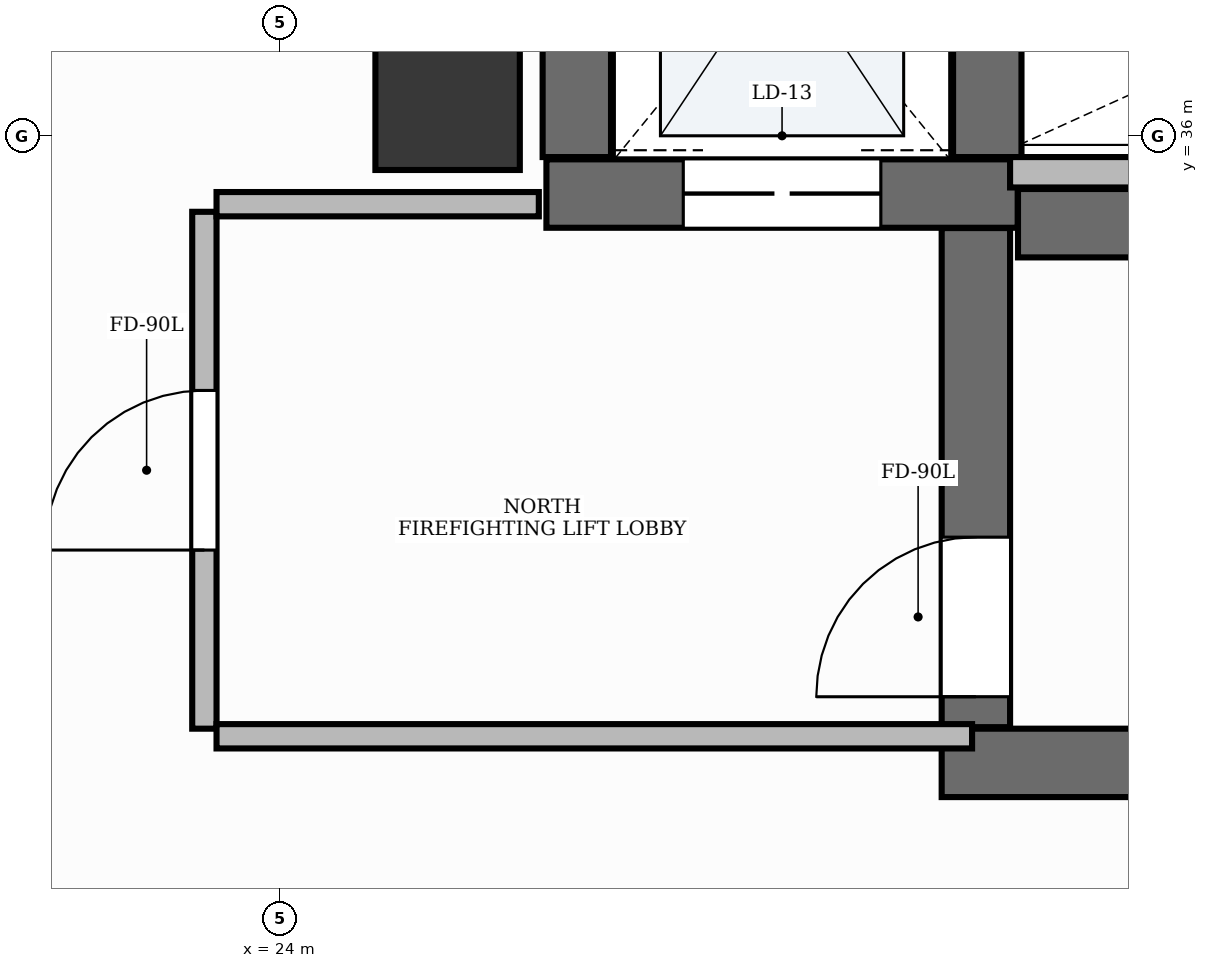
"""IFC4 building model, lengths in metres.
Left out: names, types, materials, properties, quantities, classifications, styles, units other than length and angle.
Written with IfcOpenShell. Run it as: python <this file> out.ifc"""

import sys

from ifc_helpers import new_model, si_unit, direction, frame, frame_2d, origin, origin_2d, place, context, subcontext, project, spatial, rectangle, extrude, element, fill, save


model = new_model("IFC4")
c1 = context("Model", 3, precision=1e-05, world=origin(), true_north=direction((0.0, 1.0)))
c2 = subcontext(c1, "Body", "Model", "MODEL_VIEW")
j1 = project(units=[si_unit("LENGTHUNIT", "METRE"), si_unit("PLANEANGLEUNIT", "RADIAN")], contexts=[c1])
p1 = place(None, origin())
s1 = spatial("IfcSite", under=j1, at=p1, CompositionType="ELEMENT")
p2 = place(p1, origin())
s2 = spatial("IfcBuilding", under=s1, at=p2, CompositionType="ELEMENT")
p3 = place(p2, frame((0.0, 0.0, 38.4)))
s3 = spatial("IfcBuildingStorey", under=s2, at=p3, CompositionType="ELEMENT", Elevation=38.4)
p4 = place(p3, frame((28.852, 35.425, 0.0), z_axis=(0.0, 0.0, 1.0), x_axis=(1.0, 0.0, 0.0)))
e1 = element("IfcWall", 1, at=p4, inside=s3, PredefinedType="SHEAR", context=c2, shape_type="SweptSolid", body=[
    extrude(rectangle(XDim=8.248, YDim=0.45, at=frame_2d((4.124, 0.0))), origin(), (0.0, 0.0, 1.0), 3.9),
])
p5 = place(p3, frame((28.35, 31.875, 0.0), z_axis=(0.0, 0.0, 1.0), x_axis=(1.0, 0.0, 0.0)))
e2 = element("IfcWall", 2, at=p5, inside=s3, PredefinedType="SHEAR", context=c2, shape_type="SweptSolid", body=[
    extrude(rectangle(XDim=8.75, YDim=0.45, at=frame_2d((4.375, 0.0))), origin(), (0.0, 0.0, 1.0), 3.9),
])
p6 = place(p3, frame((28.575, 32.11, 0.0), z_axis=(0.0, 0.0, 1.0), x_axis=(0.0, 1.0, 0.0)))
e3 = element("IfcWall", 3, at=p6, inside=s3, PredefinedType="SHEAR", context=c2, shape_type="SweptSolid", body=[
    extrude(rectangle(XDim=3.283, YDim=0.45, at=frame_2d((1.642, 0.0))), origin(), (0.0, 0.0, 1.0), 3.9),
])
p7 = place(p6, frame((0.2, 0.0, 0.0)))
e4 = element("IfcOpeningElement", 4, at=p7, cuts=e3, PredefinedType="OPENING", context=c2, shape_type="SweptSolid", body=[
    extrude(rectangle(XDim=1.05, YDim=2.15, at=frame_2d((0.525, 1.075))), frame((0.0, 0.24, 0.0), z_axis=(0.0, -1.0, 0.0), x_axis=(1.0, 0.0, 0.0)), (0.0, 0.0, 1.0), 0.48),
])
p8 = place(p3, frame((25.75, 35.62, 0.0), z_axis=(0.0, 0.0, 1.0), x_axis=(1.0, 0.0, 0.0)))
e5 = element("IfcWall", 5, at=p8, inside=s3, PredefinedType="SHEAR", context=c2, shape_type="SweptSolid", body=[
    extrude(rectangle(XDim=3.1, YDim=0.45, at=frame_2d((1.55, 0.0))), origin(), (0.0, 0.0, 1.0), 3.9),
])
p9 = place(p8, frame((0.9, 0.0, 0.0)))
e6 = element("IfcOpeningElement", 6, at=p9, cuts=e5, PredefinedType="OPENING", context=c2, shape_type="SweptSolid", body=[
    extrude(rectangle(XDim=1.3, YDim=2.2, at=frame_2d((0.65, 1.1))), frame((0.0, 0.24, 0.0), z_axis=(0.0, -1.0, 0.0), x_axis=(1.0, 0.0, 0.0)), (0.0, 0.0, 1.0), 0.48),
])
for number, where, z_axis, x_axis in (
    (7, (25.95, 35.86, 0.0), (0.0, 0.0, 1.0), (0.0, 1.0, 0.0)),
    (8, (28.65, 35.86, 0.0), (0.0, 0.0, 1.0), (0.0, 1.0, 0.0)),
):
    element("IfcWall", number, at=place(p3, frame(where, z_axis=z_axis, x_axis=x_axis)), inside=s3, PredefinedType="SHEAR", context=c2, shape_type="SweptSolid", body=[
        extrude(rectangle(XDim=2.7, YDim=0.45, at=frame_2d((1.35, 0.0))), origin(), (0.0, 0.0, 1.0), 3.9),
    ])
p10 = place(p3, frame((25.1, 36.25, -0.0), z_axis=(0.0, 0.0, 1.0), x_axis=(1.0, 0.0, 0.0)))
e9 = element("IfcColumn", 9, at=p10, inside=s3, PredefinedType="PILASTER", context=c2, shape_type="SweptSolid", body=[
    extrude(rectangle(XDim=0.95, YDim=0.95, at=origin_2d()), origin(), (0.0, 0.0, 1.0), 3.901),
])
p11 = place(p3, frame((28.8, 35.76, 0.0), z_axis=(0.0, 0.0, 1.0), x_axis=(1.0, 0.0, 0.0)))
e10 = element("IfcWall", 10, at=p11, inside=s3, PredefinedType="PARTITIONING", context=c2, shape_type="SweptSolid", body=[
    extrude(rectangle(XDim=4.57, YDim=0.2, at=frame_2d((2.285, 0.0))), origin(), (0.0, 0.0, 1.0), 2.91),
])
p12 = place(p3, frame((23.5, 32.1, 0.0), z_axis=(0.0, 0.0, 1.0), x_axis=(0.0, 1.0, 0.0)))
e11 = element("IfcWall", 11, at=p12, inside=s3, PredefinedType="PARTITIONING", context=c2, shape_type="SweptSolid", body=[
    extrude(rectangle(XDim=3.4, YDim=0.16, at=frame_2d((1.7, 0.0))), origin(), (0.0, 0.0, 1.0), 2.91),
])
p13 = place(p12, frame((1.175, 0.0, 0.0)))
e12 = element("IfcOpeningElement", 12, at=p13, cuts=e11, PredefinedType="OPENING", context=c2, shape_type="SweptSolid", body=[
    extrude(rectangle(XDim=1.05, YDim=2.15, at=frame_2d((0.525, 1.075))), frame((0.0, 0.095, 0.0), z_axis=(0.0, -1.0, 0.0), x_axis=(1.0, 0.0, 0.0)), (0.0, 0.0, 1.0), 0.19),
])
p14 = place(p3, frame((23.58, 32.05, 0.0), z_axis=(0.0, 0.0, 1.0), x_axis=(1.0, 0.0, 0.0)))
e13 = element("IfcWall", 13, at=p14, inside=s3, PredefinedType="PARTITIONING", context=c2, shape_type="SweptSolid", body=[
    extrude(rectangle(XDim=4.97, YDim=0.16, at=frame_2d((2.485, 0.0))), origin(), (0.0, 0.0, 1.0), 2.91),
])
p15 = place(p3, frame((23.58, 35.55, 0.0), z_axis=(0.0, 0.0, 1.0), x_axis=(1.0, 0.0, 0.0)))
e14 = element("IfcWall", 14, at=p15, inside=s3, PredefinedType="PARTITIONING", context=c2, shape_type="SweptSolid", body=[
    extrude(rectangle(XDim=2.12, YDim=0.16, at=frame_2d((1.06, 0.0))), origin(), (0.0, 0.0, 1.0), 2.91),
])
p16 = place(p7, origin())
e15 = element("IfcDoor", 15, at=p16, inside=s3, OperationType="SINGLE_SWING_LEFT", PredefinedType="DOOR", context=c2, shape_type="SweptSolid", body=[
    extrude(rectangle(XDim=1.05, YDim=2.15, at=frame_2d((0.525, 1.075))), frame((0.0, 0.025, 0.0), z_axis=(0.0, -1.0, 0.0), x_axis=(1.0, 0.0, 0.0)), (0.0, 0.0, 1.0), 0.05),
])
fill(e4, e15)
p17 = place(p9, origin())
e16 = element("IfcDoor", 16, at=p17, inside=s3, OperationType="DOUBLE_DOOR_SLIDING", PredefinedType="DOOR", context=c2, shape_type="SweptSolid", body=[
    extrude(rectangle(XDim=1.3, YDim=2.2, at=frame_2d((0.65, 1.1))), frame((0.0, 0.025, 0.0), z_axis=(0.0, -1.0, 0.0), x_axis=(1.0, 0.0, 0.0)), (0.0, 0.0, 1.0), 0.05),
])
fill(e6, e16)
p18 = place(p13, origin())
e17 = element("IfcDoor", 17, at=p18, inside=s3, OperationType="SINGLE_SWING_LEFT", PredefinedType="DOOR", context=c2, shape_type="SweptSolid", body=[
    extrude(rectangle(XDim=1.05, YDim=2.15, at=frame_2d((0.525, 1.075))), frame((0.0, 0.025, 0.0), z_axis=(0.0, -1.0, 0.0), x_axis=(1.0, 0.0, 0.0)), (0.0, 0.0, 1.0), 0.05),
])
fill(e12, e17)
save(model, sys.argv[1])
